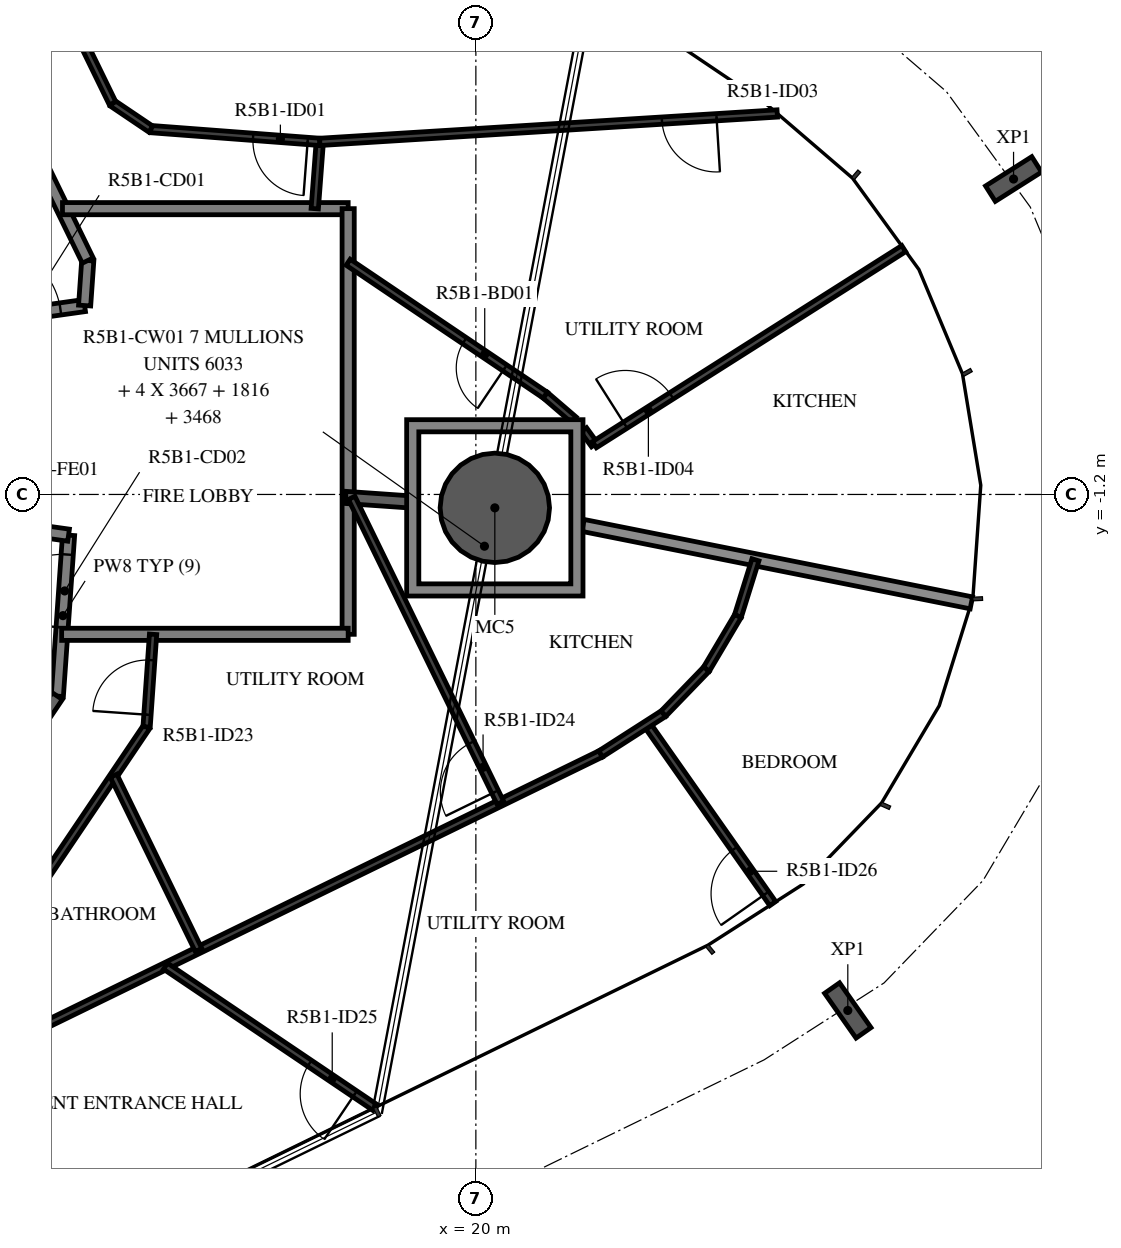
"""IFC4 building model, lengths in metres.
Left out: names, types, materials, properties, quantities, classifications, styles, units other than length and angle.
Written with IfcOpenShell. Run it as: python <this file> out.ifc"""

import sys

from ifc_helpers import new_model, si_unit, direction, frame, frame_2d, origin, origin_2d, place, context, subcontext, project, spatial, polyline, rectangle, hollow_circle, i_section, outline, extrude, element, fill, save


model = new_model("IFC4")
c1 = context("Model", 3, precision=1e-05, world=origin(), true_north=direction((0.0, 1.0)))
c2 = subcontext(c1, "Body", "Model", "MODEL_VIEW")
j1 = project(units=[si_unit("LENGTHUNIT", "METRE"), si_unit("PLANEANGLEUNIT", "RADIAN")], contexts=[c1])
p1 = place(None, origin())
s1 = spatial("IfcSite", under=j1, at=p1, CompositionType="ELEMENT")
p2 = place(p1, origin())
s2 = spatial("IfcBuilding", under=s1, at=p2, CompositionType="ELEMENT")
p3 = place(p2, frame((0.0, 0.0, 198.9)))
s3 = spatial("IfcBuildingStorey", under=s2, at=p3, CompositionType="ELEMENT", Elevation=198.9)
p4 = place(p3, frame((20.312, -1.42, -0.38), z_axis=(0.0, 0.0, 1.0), x_axis=(1.0, 0.0, 0.0)))
e1 = element("IfcColumn", 1, at=p4, inside=s3, PredefinedType="COLUMN", context=c2, shape_type="SweptSolid", body=[
    extrude(hollow_circle(Radius=0.9, WallThickness=0.04, at=origin_2d()), origin(), (0.0, 0.0, 1.0), 3.5),
])
for number, where, z_axis, x_axis in (
    (2, (26.117, -9.686, -0.38), (0.0, 0.0, 1.0), (-0.818, -0.575, 0.0)),
    (3, (28.842, 3.987, -0.38), (0.0, 0.0, 1.0), (0.535, -0.845, 0.0)),
):
    element("IfcColumn", number, at=place(p3, frame(where, z_axis=z_axis, x_axis=x_axis)), inside=s3, PredefinedType="COLUMN", context=c2, shape_type="SweptSolid", body=[
        extrude(i_section(OverallWidth=0.3, OverallDepth=0.9, WebThickness=0.019, FlangeThickness=0.035, FilletRadius=0.03, at=origin_2d()), origin(), (0.0, 0.0, 1.0), 3.5),
    ])
p5 = place(p3, frame((11.87, 1.668, 0.0), z_axis=(0.0, 0.0, 1.0), x_axis=(0.990271931984, 0.139145609792, 0.0)))
e4 = element("IfcWall", 4, at=p5, inside=s3, PredefinedType="STANDARD", context=c2, shape_type="SweptSolid", body=[
    extrude(rectangle(XDim=1.712, YDim=0.2, at=frame_2d((0.856, 0.0))), origin(), (0.0, 0.0, 1.0), 3.12),
])
p6 = place(p5, frame((0.11, 0.0, 0.0)))
e5 = element("IfcOpeningElement", 5, at=p6, cuts=e4, PredefinedType="OPENING", context=c2, shape_type="SweptSolid", body=[
    extrude(rectangle(XDim=1.2, YDim=2.1, at=frame_2d((0.6, 1.05))), frame((0.0, 0.11, 0.0), z_axis=(0.0, -1.0, 0.0), x_axis=(1.0, 0.0, 0.0)), (0.0, 0.0, 1.0), 0.22),
])
p7 = place(p3, frame((13.566, 1.906, 0.0), z_axis=(0.0, 0.0, 1.0), x_axis=(0.07005495793, 0.997543133338, 0.0)))
e6 = element("IfcWall", 6, at=p7, inside=s3, PredefinedType="STANDARD", context=c2, shape_type="SweptSolid", body=[
    extrude(rectangle(XDim=0.742, YDim=0.2, at=frame_2d((0.371, 0.0))), origin(), (0.0, 0.0, 1.0), 3.12),
])
p8 = place(p3, frame((13.618, 2.647, 0.0), z_axis=(0.0, 0.0, 1.0), x_axis=(-0.438366026218, 0.898796543751, 0.0)))
e7 = element("IfcWall", 7, at=p8, inside=s3, PredefinedType="STANDARD", context=c2, shape_type="SweptSolid", body=[
    extrude(rectangle(XDim=7.181, YDim=0.2, at=frame_2d((3.591, 0.0))), origin(), (0.0, 0.0, 1.0), 3.12),
])
p9 = place(p3, frame((13.117, -4.517, 0.0), z_axis=(0.0, 0.0, 1.0), x_axis=(0.069736659613, 0.997565435601, 0.0)))
e8 = element("IfcWall", 8, at=p9, inside=s3, PredefinedType="STANDARD", context=c2, shape_type="SweptSolid", body=[
    extrude(rectangle(XDim=2.654, YDim=0.2, at=frame_2d((1.327, 0.0))), origin(), (0.0, 0.0, 1.0), 3.12),
])
p10 = place(p9, frame((1.134, 0.0, 0.0)))
e9 = element("IfcOpeningElement", 9, at=p10, cuts=e8, PredefinedType="OPENING", context=c2, shape_type="SweptSolid", body=[
    extrude(rectangle(XDim=1.2, YDim=2.1, at=frame_2d((0.6, 1.05))), frame((0.0, 0.11, 0.0), z_axis=(0.0, -1.0, 0.0), x_axis=(1.0, 0.0, 0.0)), (0.0, 0.0, 1.0), 0.22),
])
p11 = place(p3, frame((13.302, -1.869, 0.0), z_axis=(0.0, 0.0, 1.0), x_axis=(-0.990274397042, 0.13912806533, 0.0)))
e10 = element("IfcWall", 10, at=p11, inside=s3, PredefinedType="STANDARD", context=c2, shape_type="SweptSolid", body=[
    extrude(rectangle(XDim=1.446, YDim=0.2, at=frame_2d((0.723, 0.0))), origin(), (0.0, 0.0, 1.0), 3.12),
])
p12 = place(p3, frame((9.101, -10.47, 0.0), z_axis=(0.0, 0.0, 1.0), x_axis=(0.559195469534, 0.829035841718, 0.0)))
e11 = element("IfcWall", 11, at=p12, inside=s3, PredefinedType="STANDARD", context=c2, shape_type="SweptSolid", body=[
    extrude(rectangle(XDim=7.181, YDim=0.2, at=frame_2d((3.591, 0.0))), origin(), (0.0, 0.0, 1.0), 3.12),
])
p13 = place(p3, frame((17.9, 3.5, 0.0), z_axis=(0.0, 0.0, 1.0), x_axis=(-1.0, 0.0, 0.0)))
e12 = element("IfcWall", 12, at=p13, inside=s3, PredefinedType="STANDARD", context=c2, shape_type="SweptSolid", body=[
    extrude(rectangle(XDim=4.698, YDim=0.2, at=frame_2d((2.349, 0.0))), origin(), (0.0, 0.0, 1.0), 3.12),
])
p14 = place(p3, frame((17.9, -3.5, 0.0), z_axis=(0.0, 0.0, 1.0), x_axis=(0.0, 1.0, 0.0)))
e13 = element("IfcWall", 13, at=p14, inside=s3, PredefinedType="STANDARD", context=c2, shape_type="SweptSolid", body=[
    extrude(rectangle(XDim=7.0, YDim=0.2, at=frame_2d((3.5, 0.0))), origin(), (0.0, 0.0, 1.0), 3.12),
])
p15 = place(p3, frame((13.188, -3.5, 0.0), z_axis=(0.0, 0.0, 1.0), x_axis=(1.0, 0.0, 0.0)))
e14 = element("IfcWall", 14, at=p15, inside=s3, PredefinedType="STANDARD", context=c2, shape_type="SweptSolid", body=[
    extrude(rectangle(XDim=4.712, YDim=0.2, at=frame_2d((2.356, 0.0))), origin(), (0.0, 0.0, 1.0), 3.12),
])
p16 = place(p3, frame((17.857, -1.249, 0.0), z_axis=(0.0, 0.0, 1.0), x_axis=(0.997556932604, -0.069858186453, 0.0)))
e15 = element("IfcWall", 15, at=p16, inside=s3, PredefinedType="STANDARD", context=c2, shape_type="SweptSolid", body=[
    extrude(rectangle(XDim=1.087, YDim=0.2, at=frame_2d((0.543, 0.0))), origin(), (0.0, 0.0, 1.0), 3.12),
])
p17 = place(p3, frame((21.762, -1.709, 0.0), z_axis=(0.0, 0.0, 1.0), x_axis=(0.980707365343, -0.195481619501, 0.0)))
e16 = element("IfcWall", 16, at=p17, inside=s3, PredefinedType="STANDARD", context=c2, shape_type="SweptSolid", body=[
    extrude(rectangle(XDim=6.512, YDim=0.2, at=frame_2d((3.256, 0.0))), origin(), (0.0, 0.0, 1.0), 2.73),
])
p18 = place(p3, frame((17.351, 3.5, 0.0), z_axis=(0.0, 0.0, 1.0), x_axis=(0.075374124137, 0.997155324616, 0.0)))
e17 = element("IfcWall", 17, at=p18, inside=s3, PredefinedType="PARTITIONING", context=c2, shape_type="SweptSolid", body=[
    extrude(rectangle(XDim=1.101, YDim=0.12, at=frame_2d((0.551, 0.0))), origin(), (0.0, 0.0, 1.0), 3.12),
])
p19 = place(p3, frame((17.434, 4.598, 0.0), z_axis=(0.0, 0.0, 1.0), x_axis=(-0.997152077354, 0.075417071205, 0.0)))
e18 = element("IfcWall", 18, at=p19, inside=s3, PredefinedType="PARTITIONING", context=c2, shape_type="SweptSolid", body=[
    extrude(rectangle(XDim=2.787, YDim=0.12, at=frame_2d((1.394, 0.0))), origin(), (0.0, 0.0, 1.0), 3.12),
])
p20 = place(p19, frame((0.2, 0.0, 0.0)))
e19 = element("IfcOpeningElement", 19, at=p20, cuts=e18, PredefinedType="OPENING", context=c2, shape_type="SweptSolid", body=[
    extrude(rectangle(XDim=0.9, YDim=2.1, at=frame_2d((0.45, 1.05))), frame((0.0, 0.07, 0.0), z_axis=(0.0, -1.0, 0.0), x_axis=(1.0, 0.0, 0.0)), (0.0, 0.0, 1.0), 0.14),
])
p21 = place(p3, frame((14.654, 4.808, 0.0), z_axis=(0.0, 0.0, 1.0), x_axis=(-0.829065184024, 0.559151965604, 0.0)))
e20 = element("IfcWall", 20, at=p21, inside=s3, PredefinedType="PARTITIONING", context=c2, shape_type="SweptSolid", body=[
    extrude(rectangle(XDim=0.758, YDim=0.12, at=frame_2d((0.379, 0.0))), origin(), (0.0, 0.0, 1.0), 3.12),
])
p22 = place(p3, frame((14.026, 5.232, 0.0), z_axis=(0.0, 0.0, 1.0), x_axis=(-0.438374985284, 0.89879217413, 0.0)))
e21 = element("IfcWall", 21, at=p22, inside=s3, PredefinedType="PARTITIONING", context=c2, shape_type="SweptSolid", body=[
    extrude(rectangle(XDim=5.438, YDim=0.12, at=frame_2d((2.719, 0.0))), origin(), (0.0, 0.0, 1.0), 3.12),
])
p23 = place(p3, frame((21.61, 0.03, 0.0), z_axis=(0.0, 0.0, 1.0), x_axis=(-0.758532196215, 0.651635563259, 0.0)))
e22 = element("IfcWall", 22, at=p23, inside=s3, PredefinedType="PARTITIONING", context=c2, shape_type="SweptSolid", body=[
    extrude(rectangle(XDim=0.619, YDim=0.12, at=frame_2d((0.31, 0.0))), origin(), (0.0, 0.0, 1.0), 3.12),
])
p24 = place(p3, frame((21.141, 0.433, 0.0), z_axis=(0.0, 0.0, 1.0), x_axis=(-0.829049908454, 0.559174614313, 0.0)))
e23 = element("IfcWall", 23, at=p24, inside=s3, PredefinedType="PARTITIONING", context=c2, shape_type="SweptSolid", body=[
    extrude(rectangle(XDim=3.909, YDim=0.12, at=frame_2d((1.955, 0.0))), origin(), (0.0, 0.0, 1.0), 3.12),
])
p25 = place(p24, frame((0.8, 0.0, 0.0)))
e24 = element("IfcOpeningElement", 24, at=p25, cuts=e23, PredefinedType="OPENING", context=c2, shape_type="SweptSolid", body=[
    extrude(rectangle(XDim=0.8, YDim=2.1, at=frame_2d((0.4, 1.05))), frame((0.0, 0.07, 0.0), z_axis=(0.0, -1.0, 0.0), x_axis=(1.0, 0.0, 0.0)), (0.0, 0.0, 1.0), 0.14),
])
p26 = place(p3, frame((24.956, 5.065, 0.0), z_axis=(0.0, 0.0, 1.0), x_axis=(-0.998076202118, -0.061999151332, 0.0)))
e25 = element("IfcWall", 25, at=p26, inside=s3, PredefinedType="PARTITIONING", context=c2, shape_type="SweptSolid", body=[
    extrude(rectangle(XDim=7.537, YDim=0.12, at=frame_2d((3.769, 0.0))), origin(), (0.0, 0.0, 1.0), 3.12),
])
p27 = place(p26, frame((1.0, 0.0, 0.0)))
e26 = element("IfcOpeningElement", 26, at=p27, cuts=e25, PredefinedType="OPENING", context=c2, shape_type="SweptSolid", body=[
    extrude(rectangle(XDim=0.9, YDim=2.1, at=frame_2d((0.45, 1.05))), frame((0.0, 0.07, 0.0), z_axis=(0.0, -1.0, 0.0), x_axis=(1.0, 0.0, 0.0)), (0.0, 0.0, 1.0), 0.14),
])
p28 = place(p3, frame((21.772, -0.136, 0.0), z_axis=(0.0, 0.0, 1.0), x_axis=(0.587310294779, -0.809361858285, 0.0)))
e27 = element("IfcWall", 27, at=p28, inside=s3, PredefinedType="PARTITIONING", context=c2, shape_type="SweptSolid", body=[
    extrude(rectangle(XDim=0.303, YDim=0.12, at=frame_2d((0.152, 0.0))), origin(), (0.0, 0.0, 1.0), 3.12),
])
p29 = place(p3, frame((21.95, -0.382, 0.0), z_axis=(0.0, 0.0, 1.0), x_axis=(0.844596663126, 0.535403097336, 0.0)))
e28 = element("IfcWall", 28, at=p29, inside=s3, PredefinedType="PARTITIONING", context=c2, shape_type="SweptSolid", body=[
    extrude(rectangle(XDim=6.022, YDim=0.12, at=frame_2d((3.011, 0.0))), origin(), (0.0, 0.0, 1.0), 2.73),
])
p30 = place(p29, frame((0.6, 0.0, 0.0)))
e29 = element("IfcOpeningElement", 29, at=p30, cuts=e28, PredefinedType="OPENING", context=c2, shape_type="SweptSolid", body=[
    extrude(rectangle(XDim=0.9, YDim=2.1, at=frame_2d((0.45, 1.05))), frame((0.0, 0.07, 0.0), z_axis=(0.0, -1.0, 0.0), x_axis=(1.0, 0.0, 0.0)), (0.0, 0.0, 1.0), 0.14),
])
p31 = place(p3, frame((10.12, -11.642, 0.0), z_axis=(0.0, 0.0, 1.0), x_axis=(0.55920080659, 0.829032241779, 0.0)))
e30 = element("IfcWall", 30, at=p31, inside=s3, PredefinedType="PARTITIONING", context=c2, shape_type="SweptSolid", body=[
    extrude(rectangle(XDim=7.985, YDim=0.12, at=frame_2d((3.992, 0.0))), origin(), (0.0, 0.0, 1.0), 3.12),
])
p32 = place(p31, frame((2.138, 0.0, 0.0)))
e31 = element("IfcOpeningElement", 31, at=p32, cuts=e30, PredefinedType="OPENING", context=c2, shape_type="SweptSolid", body=[
    extrude(rectangle(XDim=0.8, YDim=2.1, at=frame_2d((0.4, 1.05))), frame((0.0, 0.07, 0.0), z_axis=(0.0, -1.0, 0.0), x_axis=(1.0, 0.0, 0.0)), (0.0, 0.0, 1.0), 0.14),
])
p33 = place(p3, frame((14.585, -5.022, 0.0), z_axis=(0.0, 0.0, 1.0), x_axis=(0.069757481187, 0.997563979812, 0.0)))
e32 = element("IfcWall", 32, at=p33, inside=s3, PredefinedType="PARTITIONING", context=c2, shape_type="SweptSolid", body=[
    extrude(rectangle(XDim=1.526, YDim=0.12, at=frame_2d((0.763, 0.0))), origin(), (0.0, 0.0, 1.0), 3.12),
])
p34 = place(p33, frame((0.2, 0.0, 0.0)))
e33 = element("IfcOpeningElement", 33, at=p34, cuts=e32, PredefinedType="OPENING", context=c2, shape_type="SweptSolid", body=[
    extrude(rectangle(XDim=0.9, YDim=2.1, at=frame_2d((0.45, 1.05))), frame((0.0, 0.07, 0.0), z_axis=(0.0, -1.0, 0.0), x_axis=(1.0, 0.0, 0.0)), (0.0, 0.0, 1.0), 0.14),
])
p35 = place(p3, frame((22.052, -5.467, 0.0), z_axis=(0.0, 0.0, 1.0), x_axis=(-0.898796865831, -0.438365365846, 0.0)))
e34 = element("IfcWall", 34, at=p35, inside=s3, PredefinedType="PARTITIONING", context=c2, shape_type="SweptSolid", body=[
    extrude(rectangle(XDim=12.879, YDim=0.12, at=frame_2d((6.439, 0.0))), origin(), (0.0, 0.0, 1.0), 3.12),
])
p36 = place(p3, frame((18.343, -11.282, 0.0), z_axis=(0.0, 0.0, 1.0), x_axis=(-0.829047434778, 0.559178281845, 0.0)))
e35 = element("IfcWall", 35, at=p36, inside=s3, PredefinedType="PARTITIONING", context=c2, shape_type="SweptSolid", body=[
    extrude(rectangle(XDim=4.157, YDim=0.12, at=frame_2d((2.079, 0.0))), origin(), (0.0, 0.0, 1.0), 3.12),
])
p37 = place(p36, frame((0.4, 0.0, 0.0)))
e36 = element("IfcOpeningElement", 36, at=p37, cuts=e35, PredefinedType="OPENING", context=c2, shape_type="SweptSolid", body=[
    extrude(rectangle(XDim=0.9, YDim=2.1, at=frame_2d((0.45, 1.05))), frame((0.0, 0.07, 0.0), z_axis=(0.0, -1.0, 0.0), x_axis=(1.0, 0.0, 0.0)), (0.0, 0.0, 1.0), 0.14),
])
p38 = place(p3, frame((15.44, -8.692, 0.0), z_axis=(0.0, 0.0, 1.0), x_axis=(-0.438339139088, 0.898809656792, 0.0)))
e37 = element("IfcWall", 37, at=p38, inside=s3, PredefinedType="PARTITIONING", context=c2, shape_type="SweptSolid", body=[
    extrude(rectangle(XDim=3.188, YDim=0.12, at=frame_2d((1.594, 0.0))), origin(), (0.0, 0.0, 1.0), 3.12),
])
p39 = place(p3, frame((24.883, -7.929, 0.0), z_axis=(0.0, 0.0, 1.0), x_axis=(-0.574753041075, 0.818326916198, 0.0)))
e38 = element("IfcWall", 38, at=p39, inside=s3, PredefinedType="PARTITIONING", context=c2, shape_type="SweptSolid", body=[
    extrude(rectangle(XDim=3.603, YDim=0.12, at=frame_2d((1.802, 0.0))), origin(), (0.0, 0.0, 1.0), 3.12),
])
p40 = place(p39, frame((0.2, 0.0, 0.0)))
e39 = element("IfcOpeningElement", 39, at=p40, cuts=e38, PredefinedType="OPENING", context=c2, shape_type="SweptSolid", body=[
    extrude(rectangle(XDim=0.9, YDim=2.1, at=frame_2d((0.45, 1.05))), frame((0.0, 0.07, 0.0), z_axis=(0.0, -1.0, 0.0), x_axis=(1.0, 0.0, 0.0)), (0.0, 0.0, 1.0), 0.14),
])
p41 = place(p3, frame((23.085, -4.805, 0.0), z_axis=(0.0, 0.0, 1.0), x_axis=(-0.841804960937, -0.539781814942, 0.0)))
e40 = element("IfcWall", 40, at=p41, inside=s3, PredefinedType="PARTITIONING", context=c2, shape_type="SweptSolid", body=[
    extrude(rectangle(XDim=1.227, YDim=0.12, at=frame_2d((0.614, 0.0))), origin(), (0.0, 0.0, 1.0), 3.12),
])
p42 = place(p3, frame((20.403, -6.271, 0.0), z_axis=(0.0, 0.0, 1.0), x_axis=(-0.438371913736, 0.898793672234, 0.0)))
e41 = element("IfcWall", 41, at=p42, inside=s3, PredefinedType="PARTITIONING", context=c2, shape_type="SweptSolid", body=[
    extrude(rectangle(XDim=5.58, YDim=0.12, at=frame_2d((2.79, 0.0))), origin(), (0.0, 0.0, 1.0), 3.12),
])
p43 = place(p42, frame((0.2, 0.0, 0.0)))
e42 = element("IfcOpeningElement", 42, at=p43, cuts=e41, PredefinedType="OPENING", context=c2, shape_type="SweptSolid", body=[
    extrude(rectangle(XDim=0.9, YDim=2.1, at=frame_2d((0.45, 1.05))), frame((0.0, 0.07, 0.0), z_axis=(0.0, -1.0, 0.0), x_axis=(1.0, 0.0, 0.0)), (0.0, 0.0, 1.0), 0.14),
])
p44 = place(p3, frame((24.598, -2.275, 0.0), z_axis=(0.0, 0.0, 1.0), x_axis=(-0.297959469991, -0.95457852178, 0.0)))
e43 = element("IfcWall", 43, at=p44, inside=s3, PredefinedType="PARTITIONING", context=c2, shape_type="SweptSolid", body=[
    extrude(rectangle(XDim=0.969, YDim=0.12, at=frame_2d((0.485, 0.0))), origin(), (0.0, 0.0, 1.0), 3.12),
])
p45 = place(p3, frame((24.309, -3.2, 0.0), z_axis=(0.0, 0.0, 1.0), x_axis=(-0.509894600044, -0.860236884146, 0.0)))
e44 = element("IfcWall", 44, at=p45, inside=s3, PredefinedType="PARTITIONING", context=c2, shape_type="SweptSolid", body=[
    extrude(rectangle(XDim=1.016, YDim=0.12, at=frame_2d((0.508, 0.0))), origin(), (0.0, 0.0, 1.0), 3.12),
])
p46 = place(p3, frame((23.791, -4.074, 0.0), z_axis=(0.0, 0.0, 1.0), x_axis=(-0.694744601716, -0.719256517792, 0.0)))
e45 = element("IfcWall", 45, at=p46, inside=s3, PredefinedType="PARTITIONING", context=c2, shape_type="SweptSolid", body=[
    extrude(rectangle(XDim=1.016, YDim=0.12, at=frame_2d((0.508, 0.0))), origin(), (0.0, 0.0, 1.0), 3.12),
])
p47 = place(p3, origin())
e46 = element("IfcWall", 46, at=p47, inside=s3, PredefinedType="STANDARD", context=c2, shape_type="SweptSolid", body=[
    extrude(outline(polyline([(21.762, 0.03), (21.762, -2.87), (18.862, -2.87), (18.862, 0.03), (21.762, 0.03)]), holes=[polyline([(19.062, -2.67), (21.562, -2.67), (21.562, -0.17), (19.062, -0.17), (19.062, -2.67)])]), origin(), (0.0, 0.0, 1.0), 3.12),
])
p48 = place(p20, origin())
e47 = element("IfcDoor", 47, at=p48, inside=s3, OperationType="SINGLE_SWING_LEFT", PredefinedType="DOOR", context=c2, shape_type="SweptSolid", body=[
    extrude(rectangle(XDim=0.9, YDim=2.1, at=frame_2d((0.45, 1.05))), frame((0.0, 0.025, 0.0), z_axis=(0.0, -1.0, 0.0), x_axis=(1.0, 0.0, 0.0)), (0.0, 0.0, 1.0), 0.05),
])
fill(e19, e47)
p49 = place(p27, origin())
e48 = element("IfcDoor", 48, at=p49, inside=s3, OperationType="SINGLE_SWING_LEFT", PredefinedType="DOOR", context=c2, shape_type="SweptSolid", body=[
    extrude(rectangle(XDim=0.9, YDim=2.1, at=frame_2d((0.45, 1.05))), frame((0.0, 0.025, 0.0), z_axis=(0.0, -1.0, 0.0), x_axis=(1.0, 0.0, 0.0)), (0.0, 0.0, 1.0), 0.05),
])
fill(e26, e48)
p50 = place(p25, origin())
e49 = element("IfcDoor", 49, at=p50, inside=s3, OperationType="SINGLE_SWING_RIGHT", PredefinedType="DOOR", context=c2, shape_type="SweptSolid", body=[
    extrude(rectangle(XDim=0.8, YDim=2.1, at=frame_2d((0.4, 1.05))), frame((0.0, 0.025, 0.0), z_axis=(0.0, -1.0, 0.0), x_axis=(1.0, 0.0, 0.0)), (0.0, 0.0, 1.0), 0.05),
])
fill(e24, e49)
p51 = place(p30, origin())
e50 = element("IfcDoor", 50, at=p51, inside=s3, OperationType="SINGLE_SWING_LEFT", PredefinedType="DOOR", context=c2, shape_type="SweptSolid", body=[
    extrude(rectangle(XDim=0.9, YDim=2.1, at=frame_2d((0.45, 1.05))), frame((0.0, 0.025, 0.0), z_axis=(0.0, -1.0, 0.0), x_axis=(1.0, 0.0, 0.0)), (0.0, 0.0, 1.0), 0.05),
])
fill(e29, e50)
p52 = place(p34, origin())
e51 = element("IfcDoor", 51, at=p52, inside=s3, OperationType="SINGLE_SWING_RIGHT", PredefinedType="DOOR", context=c2, shape_type="SweptSolid", body=[
    extrude(rectangle(XDim=0.9, YDim=2.1, at=frame_2d((0.45, 1.05))), frame((0.0, 0.025, 0.0), z_axis=(0.0, -1.0, 0.0), x_axis=(1.0, 0.0, 0.0)), (0.0, 0.0, 1.0), 0.05),
])
fill(e33, e51)
p53 = place(p43, origin())
e52 = element("IfcDoor", 52, at=p53, inside=s3, OperationType="SINGLE_SWING_RIGHT", PredefinedType="DOOR", context=c2, shape_type="SweptSolid", body=[
    extrude(rectangle(XDim=0.9, YDim=2.1, at=frame_2d((0.45, 1.05))), frame((0.0, 0.025, 0.0), z_axis=(0.0, -1.0, 0.0), x_axis=(1.0, 0.0, 0.0)), (0.0, 0.0, 1.0), 0.05),
])
fill(e42, e52)
p54 = place(p37, origin())
e53 = element("IfcDoor", 53, at=p54, inside=s3, OperationType="SINGLE_SWING_RIGHT", PredefinedType="DOOR", context=c2, shape_type="SweptSolid", body=[
    extrude(rectangle(XDim=0.9, YDim=2.1, at=frame_2d((0.45, 1.05))), frame((0.0, 0.025, 0.0), z_axis=(0.0, -1.0, 0.0), x_axis=(1.0, 0.0, 0.0)), (0.0, 0.0, 1.0), 0.05),
])
fill(e36, e53)
p55 = place(p40, origin())
e54 = element("IfcDoor", 54, at=p55, inside=s3, OperationType="SINGLE_SWING_RIGHT", PredefinedType="DOOR", context=c2, shape_type="SweptSolid", body=[
    extrude(rectangle(XDim=0.9, YDim=2.1, at=frame_2d((0.45, 1.05))), frame((0.0, 0.025, 0.0), z_axis=(0.0, -1.0, 0.0), x_axis=(1.0, 0.0, 0.0)), (0.0, 0.0, 1.0), 0.05),
])
fill(e39, e54)
p56 = place(p6, origin())
e55 = element("IfcDoor", 55, at=p56, inside=s3, OperationType="DOUBLE_DOOR_SINGLE_SWING", PredefinedType="DOOR", context=c2, shape_type="SweptSolid", body=[
    extrude(rectangle(XDim=1.2, YDim=2.1, at=frame_2d((0.6, 1.05))), frame((0.0, 0.025, 0.0), z_axis=(0.0, -1.0, 0.0), x_axis=(1.0, 0.0, 0.0)), (0.0, 0.0, 1.0), 0.05),
])
fill(e5, e55)
p57 = place(p10, origin())
e56 = element("IfcDoor", 56, at=p57, inside=s3, OperationType="DOUBLE_DOOR_SINGLE_SWING", PredefinedType="DOOR", context=c2, shape_type="SweptSolid", body=[
    extrude(rectangle(XDim=1.2, YDim=2.1, at=frame_2d((0.6, 1.05))), frame((0.0, 0.025, 0.0), z_axis=(0.0, -1.0, 0.0), x_axis=(1.0, 0.0, 0.0)), (0.0, 0.0, 1.0), 0.05),
])
fill(e9, e56)
save(model, sys.argv[1])
